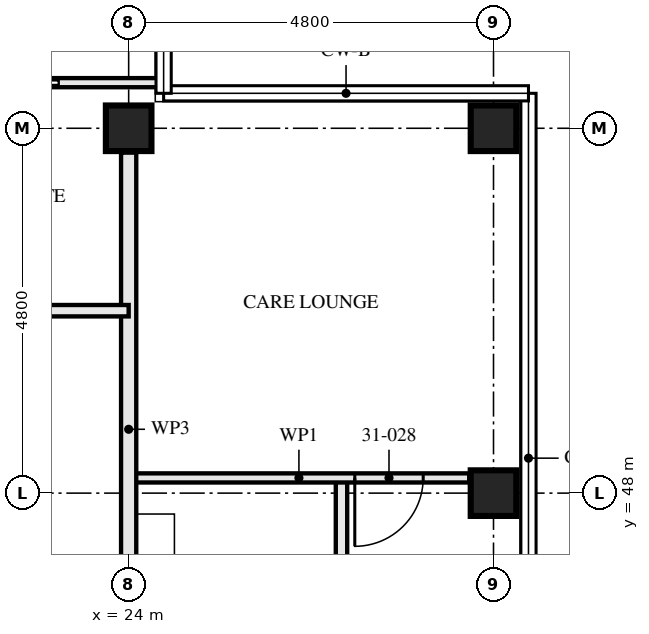
"""IFC4 building model, lengths in metres.
Left out: names, types, materials, properties, quantities, classifications, styles, units other than length and angle.
Written with IfcOpenShell. Run it as: python <this file> out.ifc"""

import sys

from ifc_helpers import new_model, si_unit, direction, frame, frame_2d, origin, origin_2d, place, context, subcontext, project, spatial, rectangle, hollow_rectangle, extrude, element, fill, save


model = new_model("IFC4")
c1 = context("Model", 3, precision=1e-05, world=origin(), true_north=direction((0.0, 1.0)))
c2 = subcontext(c1, "Body", "Model", "MODEL_VIEW")
j1 = project(units=[si_unit("LENGTHUNIT", "METRE"), si_unit("PLANEANGLEUNIT", "RADIAN")], contexts=[c1])
p1 = place(None, origin())
s1 = spatial("IfcSite", under=j1, at=p1, CompositionType="ELEMENT")
p2 = place(p1, origin())
s2 = spatial("IfcBuilding", under=s1, at=p2, CompositionType="ELEMENT")
p3 = place(p2, frame((0.0, 0.0, 115.5)))
s3 = spatial("IfcBuildingStorey", under=s2, at=p3, CompositionType="ELEMENT", Elevation=115.5)
p4 = place(p3, frame((24.0, 52.8, 0.0), z_axis=(0.0, 0.0, 1.0), x_axis=(0.0, 1.0, 0.0)))
e1 = element("IfcColumn", 1, at=p4, inside=s3, PredefinedType="COLUMN", context=c2, shape_type="SweptSolid", body=[
    extrude(hollow_rectangle(XDim=0.6, YDim=0.6, WallThickness=0.06, at=origin_2d()), origin(), (0.0, 0.0, 1.0), 3.5),
])
p5 = place(p3, frame((28.8, 48.0, 0.0), z_axis=(0.0, 0.0, 1.0), x_axis=(1.0, 0.0, 0.0)))
e2 = element("IfcColumn", 2, at=p5, inside=s3, PredefinedType="COLUMN", context=c2, shape_type="SweptSolid", body=[
    extrude(hollow_rectangle(XDim=0.6, YDim=0.6, WallThickness=0.08, at=origin_2d()), origin(), (0.0, 0.0, 1.0), 3.5),
])
p6 = place(p3, frame((28.8, 52.8, 0.0), z_axis=(0.0, 0.0, 1.0), x_axis=(0.0, 1.0, 0.0)))
e3 = element("IfcColumn", 3, at=p6, inside=s3, PredefinedType="COLUMN", context=c2, shape_type="SweptSolid", body=[
    extrude(hollow_rectangle(XDim=0.6, YDim=0.6, WallThickness=0.06, at=origin_2d()), origin(), (0.0, 0.0, 1.0), 3.5),
])
p7 = place(p3, frame((26.8, 48.2, 0.0), z_axis=(0.0, 0.0, 1.0), x_axis=(0.0, -1.0, 0.0)))
e4 = element("IfcWall", 4, at=p7, inside=s3, PredefinedType="PARTITIONING", context=c2, shape_type="SweptSolid", body=[
    extrude(rectangle(XDim=3.0, YDim=0.15, at=frame_2d((1.5, 0.0))), origin(), (0.0, 0.0, 1.0), 2.55),
])
p8 = place(p7, frame((1.05, 0.0, 0.0)))
e5 = element("IfcOpeningElement", 5, at=p8, cuts=e4, PredefinedType="OPENING", context=c2, shape_type="SweptSolid", body=[
    extrude(rectangle(XDim=0.9, YDim=2.1, at=frame_2d((0.45, 1.05))), frame((0.0, 0.085, 0.0), z_axis=(0.0, -1.0, 0.0), x_axis=(1.0, 0.0, 0.0)), (0.0, 0.0, 1.0), 0.171),
])
p9 = place(p3, frame((28.48, 48.2, 0.0), z_axis=(0.0, 0.0, 1.0), x_axis=(-1.0, 0.0, 0.0)))
e6 = element("IfcWall", 6, at=p9, inside=s3, PredefinedType="PARTITIONING", context=c2, shape_type="SweptSolid", body=[
    extrude(rectangle(XDim=4.48, YDim=0.12, at=frame_2d((2.24, 0.0))), origin(), (0.0, 0.0, 1.0), 3.33),
])
p10 = place(p9, frame((0.605, 0.0, 0.0)))
e7 = element("IfcOpeningElement", 7, at=p10, cuts=e6, PredefinedType="OPENING", context=c2, shape_type="SweptSolid", body=[
    extrude(rectangle(XDim=0.9, YDim=2.1, at=frame_2d((0.45, 1.05))), frame((0.0, 0.071, 0.0), z_axis=(0.0, -1.0, 0.0), x_axis=(1.0, 0.0, 0.0)), (0.0, 0.0, 1.0), 0.141),
])
p11 = place(p3, frame((24.0, 52.48, 0.0), z_axis=(0.0, 0.0, 1.0), x_axis=(0.0, -1.0, 0.0)))
e8 = element("IfcWall", 8, at=p11, inside=s3, PredefinedType="PARTITIONING", context=c2, shape_type="SweptSolid", body=[
    extrude(rectangle(XDim=7.28, YDim=0.2, at=frame_2d((3.64, 0.0))), origin(), (0.0, 0.0, 1.0), 2.55),
])
p12 = place(p3, frame((24.0, 50.4, 0.0), z_axis=(0.0, 0.0, 1.0), x_axis=(-1.0, 0.0, 0.0)))
e9 = element("IfcWall", 9, at=p12, inside=s3, PredefinedType="PARTITIONING", context=c2, shape_type="SweptSolid", body=[
    extrude(rectangle(XDim=2.8, YDim=0.15, at=frame_2d((1.4, 0.0))), origin(), (0.0, 0.0, 1.0), 3.33),
])
p13 = place(p3, frame((24.44, 53.4, 0.0), z_axis=(0.0, 0.0, 1.0), x_axis=(-1.0, 0.0, 0.0)))
e10 = element("IfcWall", 10, at=p13, inside=s3, PredefinedType="PARTITIONING", context=c2, shape_type="SweptSolid", body=[
    extrude(rectangle(XDim=5.24, YDim=0.12, at=frame_2d((2.62, 0.0))), origin(), (0.0, 0.0, 1.0), 2.32),
])
p14 = place(p13, frame((3.89, 0.0, 0.0)))
e11 = element("IfcOpeningElement", 11, at=p14, cuts=e10, PredefinedType="OPENING", context=c2, shape_type="SweptSolid", body=[
    extrude(rectangle(XDim=0.9, YDim=2.1, at=frame_2d((0.45, 1.05))), frame((0.0, 0.071, 0.0), z_axis=(0.0, -1.0, 0.0), x_axis=(1.0, 0.0, 0.0)), (0.0, 0.0, 1.0), 0.141),
])
p15 = place(p13, frame((1.365, 0.0, 0.0)))
e12 = element("IfcOpeningElement", 12, at=p15, cuts=e10, PredefinedType="OPENING", context=c2, shape_type="SweptSolid", body=[
    extrude(rectangle(XDim=0.95, YDim=2.1, at=frame_2d((0.475, 1.05))), frame((0.0, 0.071, 0.0), z_axis=(0.0, -1.0, 0.0), x_axis=(1.0, 0.0, 0.0)), (0.0, 0.0, 1.0), 0.141),
])
p16 = place(p10, origin())
e13 = element("IfcDoor", 13, at=p16, inside=s3, OperationType="SINGLE_SWING_LEFT", PredefinedType="DOOR", context=c2, shape_type="SweptSolid", body=[
    extrude(rectangle(XDim=0.9, YDim=2.1, at=frame_2d((0.45, 1.05))), frame((0.0, 0.022, 0.0), z_axis=(0.0, -1.0, 0.0), x_axis=(1.0, 0.0, 0.0)), (0.0, 0.0, 1.0), 0.044),
])
fill(e7, e13)
p17 = place(p15, origin())
e14 = element("IfcDoor", 14, at=p17, inside=s3, OperationType="SLIDING_TO_LEFT", PredefinedType="DOOR", context=c2, shape_type="SweptSolid", body=[
    extrude(rectangle(XDim=0.95, YDim=2.1, at=frame_2d((0.475, 1.05))), frame((0.0, 0.022, 0.0), z_axis=(0.0, -1.0, 0.0), x_axis=(1.0, 0.0, 0.0)), (0.0, 0.0, 1.0), 0.044),
])
fill(e12, e14)
save(model, sys.argv[1])
